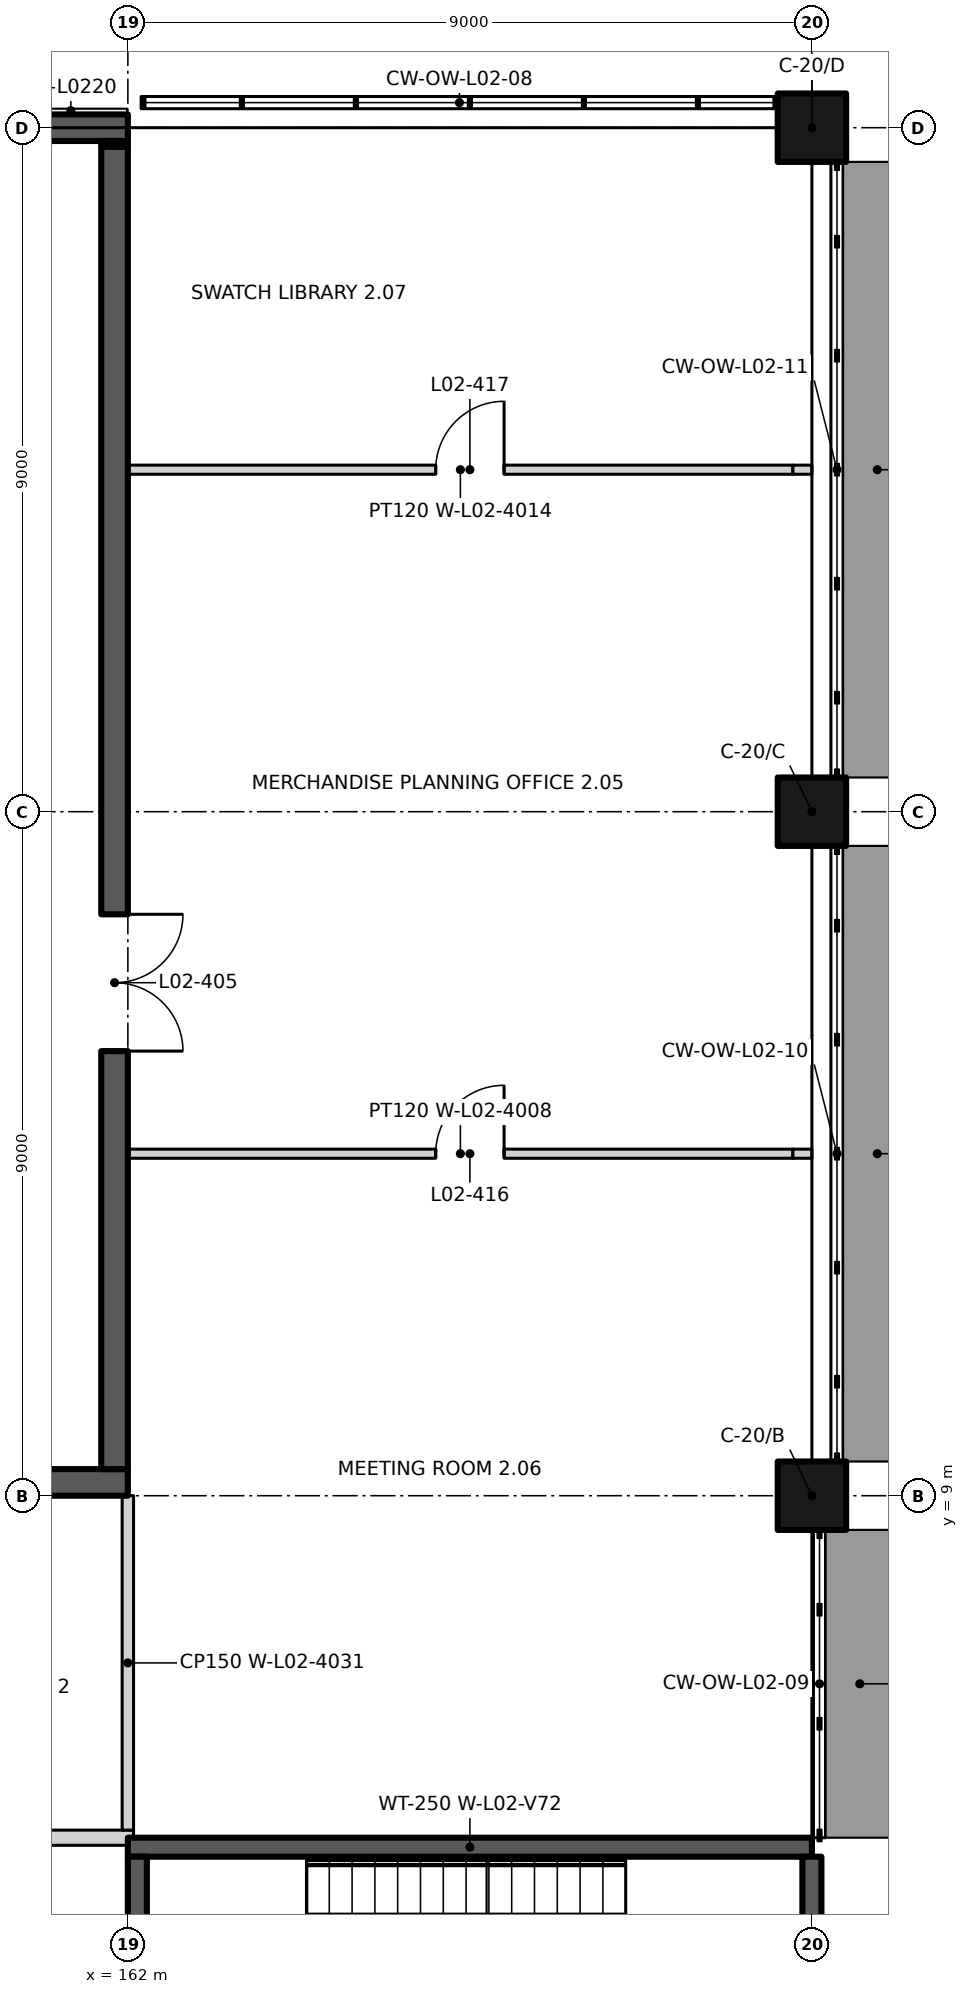
"""IFC4 building model, lengths in metres.
Left out: names, types, materials, properties, quantities, classifications, styles, units other than length and angle.
Written with IfcOpenShell. Run it as: python <this file> out.ifc"""

import sys

from ifc_helpers import new_model, si_unit, direction, frame, frame_2d, origin, origin_2d, place, context, subcontext, project, spatial, rectangle, extrude, element, fill, save


model = new_model("IFC4")
c1 = context("Model", 3, precision=1e-05, world=origin(), true_north=direction((0.0, 1.0)))
c2 = subcontext(c1, "Body", "Model", "MODEL_VIEW")
j1 = project(units=[si_unit("LENGTHUNIT", "METRE"), si_unit("PLANEANGLEUNIT", "RADIAN")], contexts=[c1])
p1 = place(None, origin())
s1 = spatial("IfcSite", under=j1, at=p1, CompositionType="ELEMENT")
p2 = place(p1, origin())
s2 = spatial("IfcBuilding", under=s1, at=p2, CompositionType="ELEMENT")
p3 = place(p2, frame((0.0, 0.0, 10.5)))
s3 = spatial("IfcBuildingStorey", under=s2, at=p3, CompositionType="ELEMENT", Elevation=10.5)
for number, where, z_axis, x_axis in (
    (1, (171.0, 9.0, 0.0), (0.0, 0.0, 1.0), (1.0, 0.0, 0.0)),
    (2, (171.0, 18.0, 0.0), (0.0, 0.0, 1.0), (1.0, 0.0, 0.0)),
    (3, (171.0, 27.0, 0.0), (0.0, 0.0, 1.0), (1.0, 0.0, 0.0)),
):
    element("IfcColumn", number, at=place(p3, frame(where, z_axis=z_axis, x_axis=x_axis)), inside=s3, PredefinedType="COLUMN", context=c2, shape_type="SweptSolid", body=[
        extrude(rectangle(XDim=0.9, YDim=0.9, at=origin_2d()), origin(), (0.0, 0.0, 1.0), 4.5),
    ])
p4 = place(p3, frame((162.0, 4.375, 0.0), z_axis=(0.0, 0.0, 1.0), x_axis=(1.0, 0.0, 0.0)))
e4 = element("IfcWall", 4, at=p4, inside=s3, PredefinedType="SHEAR", context=c2, shape_type="SweptSolid", body=[
    extrude(rectangle(XDim=9.0, YDim=0.25, at=frame_2d((4.5, 0.0))), origin(), (0.0, 0.0, 1.0), 4.5),
])
p5 = place(p3, frame((162.125, 0.45, 0.0), z_axis=(0.0, 0.0, 1.0), x_axis=(0.0, 1.0, 0.0)))
e5 = element("IfcWall", 5, at=p5, inside=s3, PredefinedType="SHEAR", context=c2, shape_type="SweptSolid", body=[
    extrude(rectangle(XDim=3.8, YDim=0.25, at=frame_2d((1.9, 0.0))), origin(), (0.0, 0.0, 1.0), 4.5),
])
p6 = place(p5, frame((2.35, 0.0, 0.0), z_axis=(0.0, 0.0, 1.0), x_axis=(-1.0, 0.0, 0.0)))
e6 = element("IfcOpeningElement", 6, at=p6, cuts=e5, PredefinedType="OPENING", context=c2, shape_type="SweptSolid", body=[
    extrude(rectangle(XDim=1.1, YDim=2.1, at=frame_2d((0.55, 1.05))), frame((0.0, 0.135, 0.0), z_axis=(0.0, -1.0, 0.0), x_axis=(1.0, 0.0, 0.0)), (0.0, 0.0, 1.0), 0.27),
])
p7 = place(p3, frame((171.0, 2.188, 0.0), z_axis=(0.0, 0.0, 1.0), x_axis=(0.0, 1.0, 0.0)))
e7 = element("IfcWall", 7, at=p7, inside=s3, PredefinedType="SHEAR", context=c2, shape_type="SweptSolid", body=[
    extrude(rectangle(XDim=2.062, YDim=0.25, at=frame_2d((1.031, 0.0))), origin(), (0.0, 0.0, 1.0), 4.5),
])
p8 = place(p3, frame((144.0, 27.0, 0.0), z_axis=(0.0, 0.0, 1.0), x_axis=(1.0, 0.0, 0.0)))
e8 = element("IfcWall", 8, at=p8, inside=s3, PredefinedType="SOLIDWALL", context=c2, shape_type="SweptSolid", body=[
    extrude(rectangle(XDim=18.0, YDim=0.35, at=frame_2d((9.0, 0.0))), origin(), (0.0, 0.0, 1.0), 3.6),
])
p9 = place(p8, frame((4.2, 0.0, 0.6)))
e9 = element("IfcOpeningElement", 9, at=p9, cuts=e8, PredefinedType="OPENING", context=c2, shape_type="SweptSolid", body=[
    extrude(rectangle(XDim=0.6, YDim=2.4, at=frame_2d((0.3, 1.2))), frame((0.0, 0.185, 0.0), z_axis=(0.0, -1.0, 0.0), x_axis=(1.0, 0.0, 0.0)), (0.0, 0.0, 1.0), 0.37),
])
p10 = place(p8, frame((13.2, 0.0, 0.6)))
e10 = element("IfcOpeningElement", 10, at=p10, cuts=e8, PredefinedType="OPENING", context=c2, shape_type="SweptSolid", body=[
    extrude(rectangle(XDim=0.6, YDim=2.4, at=frame_2d((0.3, 1.2))), frame((0.0, 0.185, 0.0), z_axis=(0.0, -1.0, 0.0), x_axis=(1.0, 0.0, 0.0)), (0.0, 0.0, 1.0), 0.37),
])
p11 = place(p3, frame((158.9, 4.5, 0.0), z_axis=(0.0, 0.0, 1.0), x_axis=(1.0, 0.0, 0.0)))
e11 = element("IfcWall", 11, at=p11, inside=s3, PredefinedType="PARTITIONING", context=c2, shape_type="SweptSolid", body=[
    extrude(rectangle(XDim=3.175, YDim=0.2, at=frame_2d((1.587, 0.0))), origin(), (0.0, 0.0, 1.0), 4.2),
])
p12 = place(p3, frame((144.0, 9.175, 0.0), z_axis=(0.0, 0.0, 1.0), x_axis=(1.0, 0.0, 0.0)))
e12 = element("IfcWall", 12, at=p12, inside=s3, PredefinedType="SHEAR", context=c2, shape_type="SweptSolid", body=[
    extrude(rectangle(XDim=18.0, YDim=0.35, at=frame_2d((9.0, 0.0))), origin(), (0.0, 0.0, 1.0), 4.2),
])
p13 = place(p12, frame((16.463, 0.0, 0.0), z_axis=(0.0, 0.0, 1.0), x_axis=(-1.0, 0.0, 0.0)))
e13 = element("IfcOpeningElement", 13, at=p13, cuts=e12, PredefinedType="OPENING", context=c2, shape_type="SweptSolid", body=[
    extrude(rectangle(XDim=2.1, YDim=2.4, at=frame_2d((1.05, 1.2))), frame((0.0, 0.185, 0.0), z_axis=(0.0, -1.0, 0.0), x_axis=(1.0, 0.0, 0.0)), (0.0, 0.0, 1.0), 0.37),
])
p14 = place(p3, frame((162.0, 13.5, 0.0), z_axis=(0.0, 0.0, 1.0), x_axis=(1.0, 0.0, 0.0)))
e14 = element("IfcWall", 14, at=p14, inside=s3, PredefinedType="PARTITIONING", context=c2, shape_type="SweptSolid", body=[
    extrude(rectangle(XDim=8.75, YDim=0.12, at=frame_2d((4.375, 0.0))), origin(), (0.0, 0.0, 1.0), 4.2),
])
p15 = place(p14, frame((4.05, 0.0, 0.0)))
e15 = element("IfcOpeningElement", 15, at=p15, cuts=e14, PredefinedType="OPENING", context=c2, shape_type="SweptSolid", body=[
    extrude(rectangle(XDim=0.9, YDim=2.1, at=frame_2d((0.45, 1.05))), frame((0.0, 0.07, 0.0), z_axis=(0.0, -1.0, 0.0), x_axis=(1.0, 0.0, 0.0)), (0.0, 0.0, 1.0), 0.14),
])
p16 = place(p3, frame((170.75, 13.5, 0.0), z_axis=(0.0, 0.0, 1.0), x_axis=(1.0, 0.0, 0.0)))
e16 = element("IfcWall", 16, at=p16, inside=s3, PredefinedType="PARTITIONING", context=c2, shape_type="SweptSolid", body=[
    extrude(rectangle(XDim=0.25, YDim=0.12, at=frame_2d((0.125, 0.0))), origin(), (0.0, 0.0, 1.0), 3.6),
])
p17 = place(p3, frame((162.0, 22.5, 0.0), z_axis=(0.0, 0.0, 1.0), x_axis=(1.0, 0.0, 0.0)))
e17 = element("IfcWall", 17, at=p17, inside=s3, PredefinedType="PARTITIONING", context=c2, shape_type="SweptSolid", body=[
    extrude(rectangle(XDim=8.75, YDim=0.12, at=frame_2d((4.375, 0.0))), origin(), (0.0, 0.0, 1.0), 4.2),
])
p18 = place(p17, frame((4.05, 0.0, 0.0)))
e18 = element("IfcOpeningElement", 18, at=p18, cuts=e17, PredefinedType="OPENING", context=c2, shape_type="SweptSolid", body=[
    extrude(rectangle(XDim=0.9, YDim=2.1, at=frame_2d((0.45, 1.05))), frame((0.0, 0.07, 0.0), z_axis=(0.0, -1.0, 0.0), x_axis=(1.0, 0.0, 0.0)), (0.0, 0.0, 1.0), 0.14),
])
p19 = place(p3, frame((170.75, 22.5, 0.0), z_axis=(0.0, 0.0, 1.0), x_axis=(1.0, 0.0, 0.0)))
e19 = element("IfcWall", 19, at=p19, inside=s3, PredefinedType="PARTITIONING", context=c2, shape_type="SweptSolid", body=[
    extrude(rectangle(XDim=0.25, YDim=0.12, at=frame_2d((0.125, 0.0))), origin(), (0.0, 0.0, 1.0), 3.6),
])
p20 = place(p3, frame((161.825, 9.35, 0.0), z_axis=(0.0, 0.0, 1.0), x_axis=(0.0, 1.0, 0.0)))
e20 = element("IfcWall", 20, at=p20, inside=s3, PredefinedType="SHEAR", context=c2, shape_type="SweptSolid", body=[
    extrude(rectangle(XDim=17.4, YDim=0.35, at=frame_2d((8.7, 0.0))), origin(), (0.0, 0.0, 1.0), 4.2),
])
p21 = place(p20, frame((7.3, 0.0, 0.0), z_axis=(0.0, 0.0, 1.0), x_axis=(-1.0, 0.0, 0.0)))
e21 = element("IfcOpeningElement", 21, at=p21, cuts=e20, PredefinedType="OPENING", context=c2, shape_type="SweptSolid", body=[
    extrude(rectangle(XDim=1.8, YDim=2.4, at=frame_2d((0.9, 1.2))), frame((0.0, 0.185, 0.0), z_axis=(0.0, -1.0, 0.0), x_axis=(1.0, 0.0, 0.0)), (0.0, 0.0, 1.0), 0.37),
])
p22 = place(p3, frame((161.825, 26.75, 0.0), z_axis=(0.0, 0.0, 1.0), x_axis=(0.0, 1.0, 0.0)))
e22 = element("IfcWall", 22, at=p22, inside=s3, PredefinedType="SHEAR", context=c2, shape_type="SweptSolid", body=[
    extrude(rectangle(XDim=0.075, YDim=0.35, at=frame_2d((0.038, 0.0))), origin(), (0.0, 0.0, 1.0), 3.6),
])
p23 = place(p3, frame((162.0, 4.6, 0.0), z_axis=(0.0, 0.0, 1.0), x_axis=(0.0, 1.0, 0.0)))
e23 = element("IfcWall", 23, at=p23, inside=s3, PredefinedType="PARTITIONING", context=c2, shape_type="SweptSolid", body=[
    extrude(rectangle(XDim=4.4, YDim=0.15, at=frame_2d((2.2, 0.0))), origin(), (0.0, 0.0, 1.0), 4.2),
])
p24 = place(p21, origin())
e24 = element("IfcDoor", 24, at=p24, inside=s3, OperationType="DOUBLE_DOOR_SINGLE_SWING", PredefinedType="DOOR", context=c2, shape_type="SweptSolid", body=[
    extrude(rectangle(XDim=1.8, YDim=2.4, at=frame_2d((0.9, 1.2))), frame((0.0, 0.025, 0.0), z_axis=(0.0, -1.0, 0.0), x_axis=(1.0, 0.0, 0.0)), (0.0, 0.0, 1.0), 0.05),
])
fill(e21, e24)
p25 = place(p15, origin())
e25 = element("IfcDoor", 25, at=p25, inside=s3, OperationType="SINGLE_SWING_RIGHT", PredefinedType="DOOR", context=c2, shape_type="SweptSolid", body=[
    extrude(rectangle(XDim=0.9, YDim=2.1, at=frame_2d((0.45, 1.05))), frame((0.0, 0.025, 0.0), z_axis=(0.0, -1.0, 0.0), x_axis=(1.0, 0.0, 0.0)), (0.0, 0.0, 1.0), 0.05),
])
fill(e15, e25)
p26 = place(p18, origin())
e26 = element("IfcDoor", 26, at=p26, inside=s3, OperationType="SINGLE_SWING_RIGHT", PredefinedType="DOOR", context=c2, shape_type="SweptSolid", body=[
    extrude(rectangle(XDim=0.9, YDim=2.1, at=frame_2d((0.45, 1.05))), frame((0.0, 0.025, 0.0), z_axis=(0.0, -1.0, 0.0), x_axis=(1.0, 0.0, 0.0)), (0.0, 0.0, 1.0), 0.05),
])
fill(e18, e26)
save(model, sys.argv[1])
